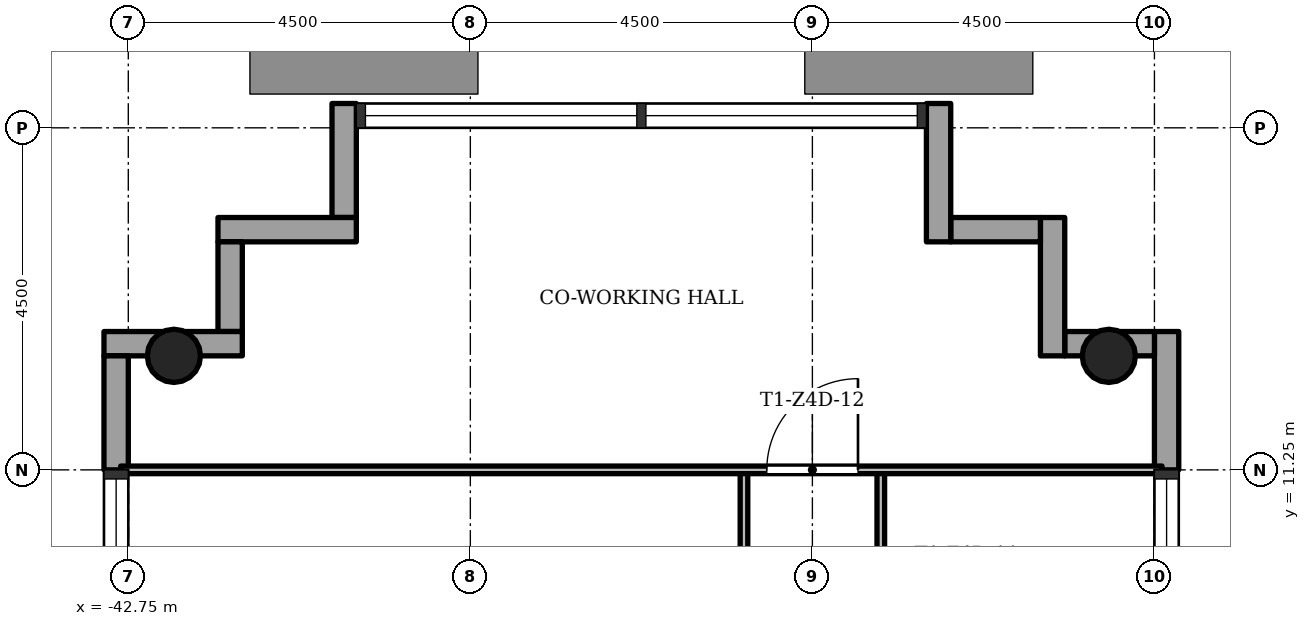
"""IFC4 building model, lengths in metres.
Left out: names, types, materials, properties, quantities, classifications, styles, units other than length and angle.
Written with IfcOpenShell. Run it as: python <this file> out.ifc"""

import sys

from ifc_helpers import new_model, si_unit, direction, frame, frame_2d, origin, origin_2d, place, context, subcontext, project, spatial, rectangle, hollow_circle, extrude, element, fill, save


model = new_model("IFC4")
c1 = context("Model", 3, precision=1e-05, world=origin(), true_north=direction((0.0, 1.0)))
c2 = subcontext(c1, "Body", "Model", "MODEL_VIEW")
j1 = project(units=[si_unit("LENGTHUNIT", "METRE"), si_unit("PLANEANGLEUNIT", "RADIAN")], contexts=[c1])
p1 = place(None, origin())
s1 = spatial("IfcSite", under=j1, at=p1, CompositionType="ELEMENT")
p2 = place(p1, origin())
s2 = spatial("IfcBuilding", under=s1, at=p2, CompositionType="ELEMENT")
p3 = place(p2, frame((0.0, 0.0, 202.8)))
s3 = spatial("IfcBuildingStorey", under=s2, at=p3, CompositionType="ELEMENT", Elevation=202.8)
for number, where, z_axis, x_axis in (
    (1, (-29.85, 12.75, 0.0), (0.0, 0.0, 1.0), (1.0, 0.0, 0.0)),
    (2, (-42.15, 12.75, 0.0), (0.0, 0.0, 1.0), (1.0, 0.0, 0.0)),
):
    element("IfcColumn", number, at=place(p3, frame(where, z_axis=z_axis, x_axis=x_axis)), inside=s3, PredefinedType="COLUMN", context=c2, shape_type="SweptSolid", body=[
        extrude(hollow_circle(Radius=0.35, WallThickness=0.025, at=origin_2d()), origin(), (0.0, 0.0, 1.0), 3.4),
    ])
p4 = place(p3, frame((-29.09, 11.25, -0.3), z_axis=(0.0, 0.0, 1.0), x_axis=(0.0, 1.0, 0.0)))
e3 = element("IfcWall", 3, at=p4, inside=s3, PredefinedType="STANDARD", context=c2, shape_type="SweptSolid", body=[
    extrude(rectangle(XDim=1.82, YDim=0.32, at=frame_2d((0.91, 0.0))), origin(), (0.0, 0.0, 1.0), 3.4),
])
p5 = place(p3, frame((-29.25, 12.91, -0.3), z_axis=(0.0, 0.0, 1.0), x_axis=(-1.0, 0.0, 0.0)))
e4 = element("IfcWall", 4, at=p5, inside=s3, PredefinedType="STANDARD", context=c2, shape_type="SweptSolid", body=[
    extrude(rectangle(XDim=1.18, YDim=0.32, at=frame_2d((0.59, 0.0))), origin(), (0.0, 0.0, 1.0), 3.4),
])
p6 = place(p3, frame((-30.59, 12.75, -0.3), z_axis=(0.0, 0.0, 1.0), x_axis=(0.0, 1.0, 0.0)))
e5 = element("IfcWall", 5, at=p6, inside=s3, PredefinedType="STANDARD", context=c2, shape_type="SweptSolid", body=[
    extrude(rectangle(XDim=1.82, YDim=0.32, at=frame_2d((0.91, 0.0))), origin(), (0.0, 0.0, 1.0), 3.4),
])
p7 = place(p3, frame((-30.75, 14.41, -0.3), z_axis=(0.0, 0.0, 1.0), x_axis=(-1.0, 0.0, 0.0)))
e6 = element("IfcWall", 6, at=p7, inside=s3, PredefinedType="STANDARD", context=c2, shape_type="SweptSolid", body=[
    extrude(rectangle(XDim=1.18, YDim=0.32, at=frame_2d((0.59, 0.0))), origin(), (0.0, 0.0, 1.0), 3.4),
])
p8 = place(p3, frame((-32.09, 14.25, -0.3), z_axis=(0.0, 0.0, 1.0), x_axis=(0.0, 1.0, 0.0)))
e7 = element("IfcWall", 7, at=p8, inside=s3, PredefinedType="STANDARD", context=c2, shape_type="SweptSolid", body=[
    extrude(rectangle(XDim=1.82, YDim=0.32, at=frame_2d((0.91, 0.0))), origin(), (0.0, 0.0, 1.0), 3.4),
])
p9 = place(p3, frame((-39.91, 16.07, -0.3), z_axis=(0.0, 0.0, 1.0), x_axis=(0.0, -1.0, 0.0)))
e8 = element("IfcWall", 8, at=p9, inside=s3, PredefinedType="STANDARD", context=c2, shape_type="SweptSolid", body=[
    extrude(rectangle(XDim=1.5, YDim=0.32, at=frame_2d((0.75, 0.0))), origin(), (0.0, 0.0, 1.0), 3.4),
])
p10 = place(p3, frame((-39.75, 14.41, -0.3), z_axis=(0.0, 0.0, 1.0), x_axis=(-1.0, 0.0, 0.0)))
e9 = element("IfcWall", 9, at=p10, inside=s3, PredefinedType="STANDARD", context=c2, shape_type="SweptSolid", body=[
    extrude(rectangle(XDim=1.82, YDim=0.32, at=frame_2d((0.91, 0.0))), origin(), (0.0, 0.0, 1.0), 3.4),
])
p11 = place(p3, frame((-41.41, 14.25, -0.3), z_axis=(0.0, 0.0, 1.0), x_axis=(0.0, -1.0, 0.0)))
e10 = element("IfcWall", 10, at=p11, inside=s3, PredefinedType="STANDARD", context=c2, shape_type="SweptSolid", body=[
    extrude(rectangle(XDim=1.18, YDim=0.32, at=frame_2d((0.59, 0.0))), origin(), (0.0, 0.0, 1.0), 3.4),
])
p12 = place(p3, frame((-41.25, 12.91, -0.3), z_axis=(0.0, 0.0, 1.0), x_axis=(-1.0, 0.0, 0.0)))
e11 = element("IfcWall", 11, at=p12, inside=s3, PredefinedType="STANDARD", context=c2, shape_type="SweptSolid", body=[
    extrude(rectangle(XDim=1.82, YDim=0.32, at=frame_2d((0.91, 0.0))), origin(), (0.0, 0.0, 1.0), 3.4),
])
p13 = place(p3, frame((-42.91, 12.75, -0.3), z_axis=(0.0, 0.0, 1.0), x_axis=(0.0, -1.0, 0.0)))
e12 = element("IfcWall", 12, at=p13, inside=s3, PredefinedType="STANDARD", context=c2, shape_type="SweptSolid", body=[
    extrude(rectangle(XDim=1.5, YDim=0.32, at=frame_2d((0.75, 0.0))), origin(), (0.0, 0.0, 1.0), 3.4),
])
p14 = place(p3, frame((-34.65, 8.55, 0.0), z_axis=(0.0, 0.0, 1.0), x_axis=(0.0, 1.0, 0.0)))
e13 = element("IfcWall", 13, at=p14, inside=s3, PredefinedType="PARTITIONING", context=c2, shape_type="SweptSolid", body=[
    extrude(rectangle(XDim=2.7, YDim=0.1, at=frame_2d((1.35, 0.0))), origin(), (0.0, 0.0, 1.0), 3.0),
])
p15 = place(p14, frame((0.07, 0.0, 0.0)))
e14 = element("IfcOpeningElement", 14, at=p15, cuts=e13, PredefinedType="OPENING", context=c2, shape_type="SweptSolid", body=[
    extrude(rectangle(XDim=0.9, YDim=2.1, at=frame_2d((0.45, 1.05))), frame((0.0, 0.06, 0.0), z_axis=(0.0, -1.0, 0.0), x_axis=(1.0, 0.0, 0.0)), (0.0, 0.0, 1.0), 0.12),
])
p16 = place(p3, frame((-32.85, 6.75, 0.0), z_axis=(0.0, 0.0, 1.0), x_axis=(0.0, 1.0, 0.0)))
e15 = element("IfcWall", 15, at=p16, inside=s3, PredefinedType="PARTITIONING", context=c2, shape_type="SweptSolid", body=[
    extrude(rectangle(XDim=4.5, YDim=0.1, at=frame_2d((2.25, 0.0))), origin(), (0.0, 0.0, 1.0), 3.0),
])
p17 = place(p16, frame((1.8, 0.0, 0.0)))
e16 = element("IfcOpeningElement", 16, at=p17, cuts=e15, PredefinedType="OPENING", context=c2, shape_type="SweptSolid", body=[
    extrude(rectangle(XDim=0.9, YDim=2.1, at=frame_2d((0.45, 1.05))), frame((0.0, 0.06, 0.0), z_axis=(0.0, -1.0, 0.0), x_axis=(1.0, 0.0, 0.0)), (0.0, 0.0, 1.0), 0.12),
])
p18 = place(p3, frame((-42.85, 11.25, 0.0), z_axis=(0.0, 0.0, 1.0), x_axis=(1.0, 0.0, 0.0)))
e17 = element("IfcWall", 17, at=p18, inside=s3, PredefinedType="PARTITIONING", context=c2, shape_type="SweptSolid", body=[
    extrude(rectangle(XDim=13.7, YDim=0.1, at=frame_2d((6.85, 0.0))), origin(), (0.0, 0.0, 1.0), 3.0),
])
p19 = place(p18, frame((8.5, 0.0, 0.0)))
e18 = element("IfcOpeningElement", 18, at=p19, cuts=e17, PredefinedType="OPENING", context=c2, shape_type="SweptSolid", body=[
    extrude(rectangle(XDim=1.2, YDim=2.1, at=frame_2d((0.6, 1.05))), frame((0.0, 0.06, 0.0), z_axis=(0.0, -1.0, 0.0), x_axis=(1.0, 0.0, 0.0)), (0.0, 0.0, 1.0), 0.12),
])
p20 = place(p19, origin())
e19 = element("IfcDoor", 19, at=p20, inside=s3, OperationType="SINGLE_SWING_LEFT", PredefinedType="DOOR", context=c2, shape_type="SweptSolid", body=[
    extrude(rectangle(XDim=1.2, YDim=2.1, at=frame_2d((0.6, 1.05))), frame((0.0, 0.025, 0.0), z_axis=(0.0, -1.0, 0.0), x_axis=(1.0, 0.0, 0.0)), (0.0, 0.0, 1.0), 0.05),
])
fill(e18, e19)
save(model, sys.argv[1])
